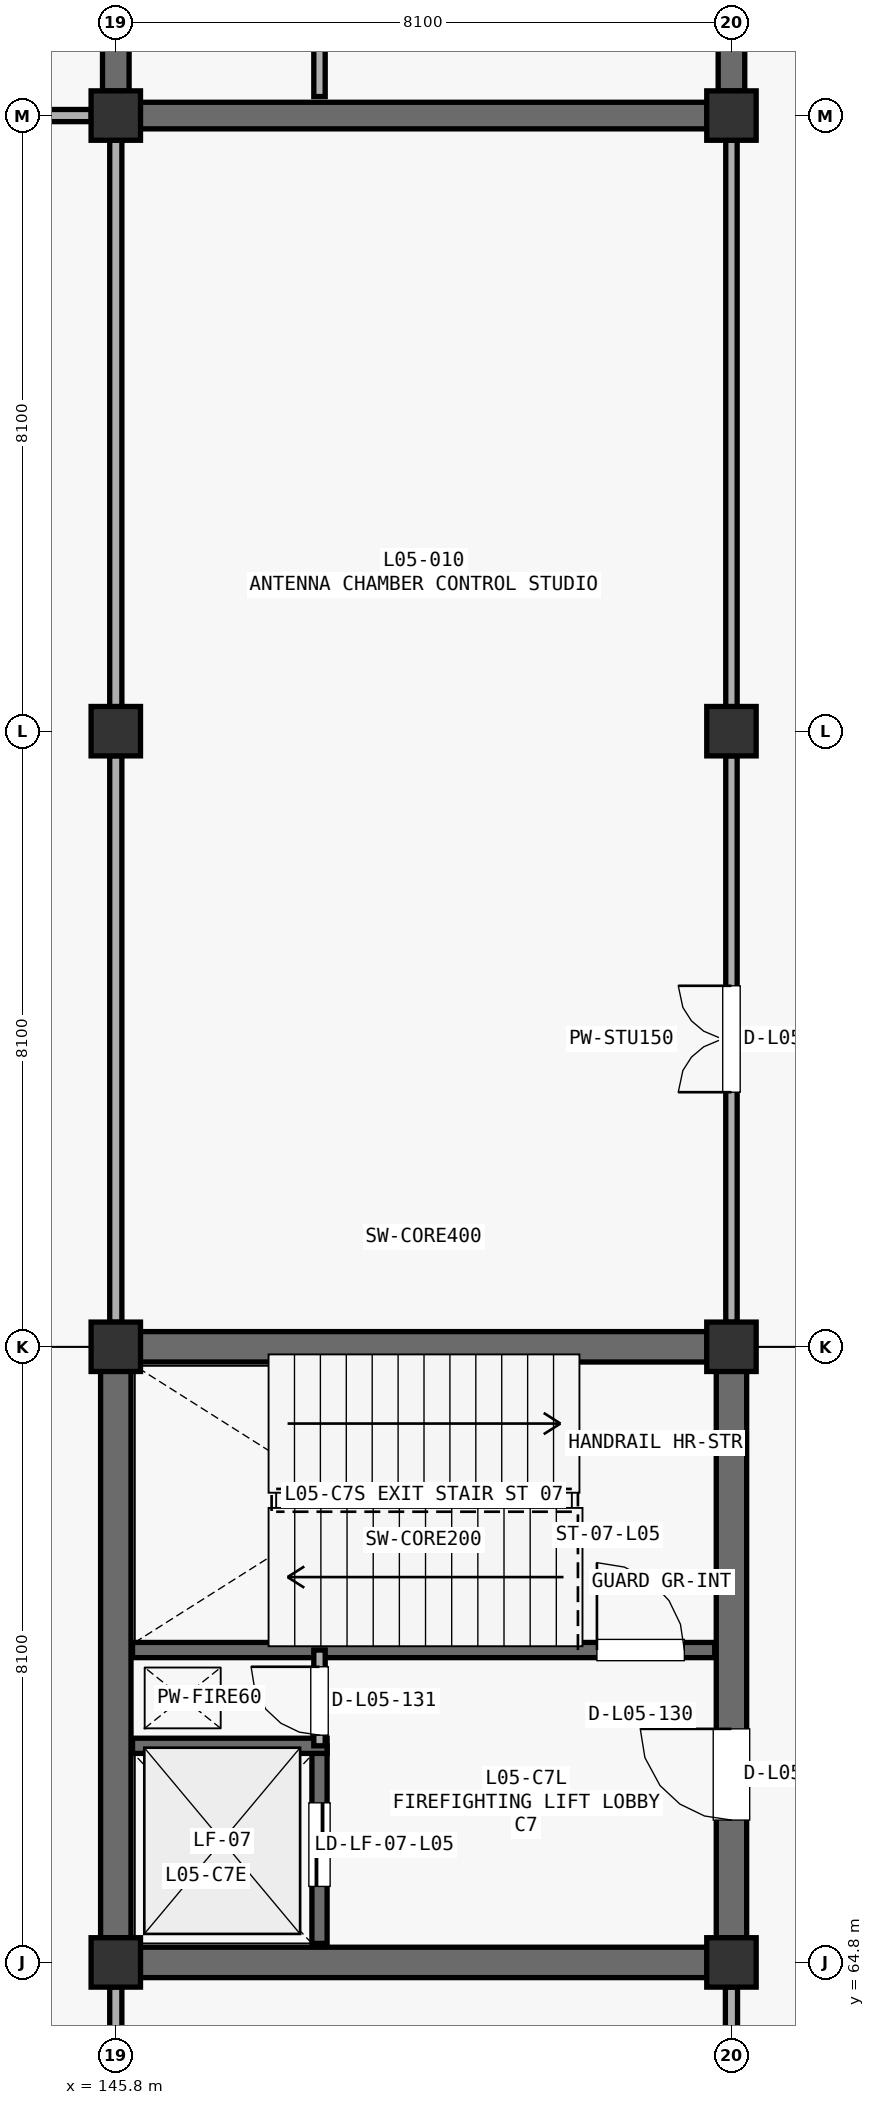
"""IFC4 building model, lengths in metres.
Left out: names, types, materials, properties, quantities, classifications, styles, units other than length and angle.
Written with IfcOpenShell. Run it as: python <this file> out.ifc"""

import sys

from ifc_helpers import new_model, si_unit, direction, frame, frame_2d, origin, origin_2d, place, context, subcontext, project, spatial, rectangle, extrude, element, fill, save


model = new_model("IFC4")
c1 = context("Model", 3, precision=1e-05, world=origin(), true_north=direction((0.0, 1.0)))
c2 = subcontext(c1, "Body", "Model", "MODEL_VIEW")
j1 = project(units=[si_unit("LENGTHUNIT", "METRE"), si_unit("PLANEANGLEUNIT", "RADIAN")], contexts=[c1])
p1 = place(None, origin())
s1 = spatial("IfcSite", under=j1, at=p1, CompositionType="ELEMENT")
p2 = place(p1, origin())
s2 = spatial("IfcBuilding", under=s1, at=p2, CompositionType="ELEMENT")
p3 = place(p2, frame((0.0, 0.0, 22.95)))
s3 = spatial("IfcBuildingStorey", under=s2, at=p3, CompositionType="ELEMENT", Elevation=22.95)
for number, where, z_axis, x_axis in (
    (1, (145.8, 64.8, 0.0), (0.0, 0.0, 1.0), (1.0, 0.0, 0.0)),
    (2, (145.8, 72.9, 0.0), (0.0, 0.0, 1.0), (1.0, 0.0, 0.0)),
    (3, (145.8, 81.0, 0.0), (0.0, 0.0, 1.0), (1.0, 0.0, 0.0)),
    (4, (145.8, 89.1, 0.0), (0.0, 0.0, 1.0), (1.0, 0.0, 0.0)),
    (5, (153.9, 64.8, 0.0), (0.0, 0.0, 1.0), (1.0, 0.0, 0.0)),
    (6, (153.9, 72.9, 0.0), (0.0, 0.0, 1.0), (1.0, 0.0, 0.0)),
    (7, (153.9, 81.0, 0.0), (0.0, 0.0, 1.0), (1.0, 0.0, 0.0)),
    (8, (153.9, 89.1, 0.0), (0.0, 0.0, 1.0), (1.0, 0.0, 0.0)),
):
    element("IfcColumn", number, at=place(p3, frame(where, z_axis=z_axis, x_axis=x_axis)), inside=s3, PredefinedType="COLUMN", context=c2, shape_type="SweptSolid", body=[
        extrude(rectangle(XDim=0.65, YDim=0.65, at=origin_2d()), origin(), (0.0, 0.0, 1.0), 4.42),
    ])
for number, where, z_axis, x_axis in (
    (9, (146.123, 72.9, 0.0), (0.0, 0.0, 1.0), (1.0, 0.0, 0.0)),
    (10, (145.8, 65.123, 0.0), (0.0, 0.0, 1.0), (0.0, 1.0, 0.0)),
):
    element("IfcWall", number, at=place(p3, frame(where, z_axis=z_axis, x_axis=x_axis)), inside=s3, PredefinedType="SHEAR", context=c2, shape_type="SweptSolid", body=[
        extrude(rectangle(XDim=7.454, YDim=0.4, at=frame_2d((3.727, 0.0))), origin(), (0.0, 0.0, 1.0), 4.162),
    ])
p4 = place(p3, frame((153.9, 65.123, 0.0), z_axis=(0.0, 0.0, 1.0), x_axis=(0.0, 1.0, 0.0)))
e11 = element("IfcWall", 11, at=p4, inside=s3, PredefinedType="SHEAR", context=c2, shape_type="SweptSolid", body=[
    extrude(rectangle(XDim=7.454, YDim=0.4, at=frame_2d((3.727, 0.0))), origin(), (0.0, 0.0, 1.0), 4.162),
])
p5 = place(p4, frame((1.55, 0.0, 0.0)))
e12 = element("IfcOpeningElement", 12, at=p5, cuts=e11, PredefinedType="OPENING", context=c2, shape_type="SweptSolid", body=[
    extrude(rectangle(XDim=1.2, YDim=2.2, at=frame_2d((0.6, 1.1))), frame((0.0, 0.21, 0.0), z_axis=(0.0, -1.0, 0.0), x_axis=(1.0, 0.0, 0.0)), (0.0, 0.0, 1.0), 0.42),
])
p6 = place(p3, frame((146.123, 64.8, 0.0), z_axis=(0.0, 0.0, 1.0), x_axis=(1.0, 0.0, 0.0)))
e13 = element("IfcWall", 13, at=p6, inside=s3, PredefinedType="SHEAR", context=c2, shape_type="SweptSolid", body=[
    extrude(rectangle(XDim=7.454, YDim=0.4, at=frame_2d((3.727, 0.0))), origin(), (0.0, 0.0, 1.0), 4.162),
])
p7 = place(p3, frame((146.02, 68.91, 0.0), z_axis=(0.0, 0.0, 1.0), x_axis=(1.0, 0.0, 0.0)))
e14 = element("IfcWall", 14, at=p7, inside=s3, PredefinedType="SHEAR", context=c2, shape_type="SweptSolid", body=[
    extrude(rectangle(XDim=7.66, YDim=0.2, at=frame_2d((3.83, 0.0))), origin(), (0.0, 0.0, 1.0), 4.162),
])
p8 = place(p7, frame((6.11, 0.0, 0.0)))
e15 = element("IfcOpeningElement", 15, at=p8, cuts=e14, PredefinedType="OPENING", context=c2, shape_type="SweptSolid", body=[
    extrude(rectangle(XDim=1.15, YDim=2.2, at=frame_2d((0.575, 1.1))), frame((0.0, 0.11, 0.0), z_axis=(0.0, -1.0, 0.0), x_axis=(1.0, 0.0, 0.0)), (0.0, 0.0, 1.0), 0.22),
])
p9 = place(p3, frame((148.48, 65.05, 0.0), z_axis=(0.0, 0.0, 1.0), x_axis=(0.0, 1.0, 0.0)))
e16 = element("IfcWall", 16, at=p9, inside=s3, PredefinedType="SHEAR", context=c2, shape_type="SweptSolid", body=[
    extrude(rectangle(XDim=2.6, YDim=0.2, at=frame_2d((1.3, 0.0))), origin(), (0.0, 0.0, 1.0), 4.162),
])
p10 = place(p9, frame((0.75, 0.0, 0.0)))
e17 = element("IfcOpeningElement", 17, at=p10, cuts=e16, PredefinedType="OPENING", context=c2, shape_type="SweptSolid", body=[
    extrude(rectangle(XDim=1.1, YDim=2.2, at=frame_2d((0.55, 1.1))), frame((0.0, 0.11, 0.0), z_axis=(0.0, -1.0, 0.0), x_axis=(1.0, 0.0, 0.0)), (0.0, 0.0, 1.0), 0.22),
])
p11 = place(p3, frame((146.02, 67.65, 0.0), z_axis=(0.0, 0.0, 1.0), x_axis=(1.0, 0.0, 0.0)))
e18 = element("IfcWall", 18, at=p11, inside=s3, PredefinedType="SHEAR", context=c2, shape_type="SweptSolid", body=[
    extrude(rectangle(XDim=2.56, YDim=0.2, at=frame_2d((1.28, 0.0))), origin(), (0.0, 0.0, 1.0), 4.162),
])
p12 = place(p3, frame((148.48, 67.65, 0.0), z_axis=(0.0, 0.0, 1.0), x_axis=(0.0, 1.0, 0.0)))
e19 = element("IfcWall", 19, at=p12, inside=s3, PredefinedType="PARTITIONING", context=c2, shape_type="SweptSolid", body=[
    extrude(rectangle(XDim=1.26, YDim=0.15, at=frame_2d((0.63, 0.0))), origin(), (0.0, 0.0, 1.0), 4.162),
])
p13 = place(p12, frame((0.14, 0.0, 0.0)))
e20 = element("IfcOpeningElement", 20, at=p13, cuts=e19, PredefinedType="OPENING", context=c2, shape_type="SweptSolid", body=[
    extrude(rectangle(XDim=0.9, YDim=2.15, at=frame_2d((0.45, 1.075))), frame((0.0, 0.085, 0.0), z_axis=(0.0, -1.0, 0.0), x_axis=(1.0, 0.0, 0.0)), (0.0, 0.0, 1.0), 0.17),
])
p14 = place(p3, frame((145.8, 89.423, 0.0), z_axis=(0.0, 0.0, 1.0), x_axis=(0.0, 1.0, 0.0)))
e21 = element("IfcWall", 21, at=p14, inside=s3, PredefinedType="SHEAR", context=c2, shape_type="SweptSolid", body=[
    extrude(rectangle(XDim=7.454, YDim=0.35, at=frame_2d((3.727, 0.0))), origin(), (0.0, 0.0, 1.0), 4.162),
])
p15 = place(p3, frame((153.9, 89.423, 0.0), z_axis=(0.0, 0.0, 1.0), x_axis=(0.0, 1.0, 0.0)))
e22 = element("IfcWall", 22, at=p15, inside=s3, PredefinedType="SHEAR", context=c2, shape_type="SweptSolid", body=[
    extrude(rectangle(XDim=7.454, YDim=0.35, at=frame_2d((3.727, 0.0))), origin(), (0.0, 0.0, 1.0), 4.162),
])
p16 = place(p15, frame((1.55, 0.0, 0.0)))
e23 = element("IfcOpeningElement", 23, at=p16, cuts=e22, PredefinedType="OPENING", context=c2, shape_type="SweptSolid", body=[
    extrude(rectangle(XDim=1.2, YDim=2.2, at=frame_2d((0.6, 1.1))), frame((0.0, 0.185, 0.0), z_axis=(0.0, -1.0, 0.0), x_axis=(1.0, 0.0, 0.0)), (0.0, 0.0, 1.0), 0.37),
])
p17 = place(p3, frame((146.123, 89.1, 0.0), z_axis=(0.0, 0.0, 1.0), x_axis=(1.0, 0.0, 0.0)))
e24 = element("IfcWall", 24, at=p17, inside=s3, PredefinedType="SHEAR", context=c2, shape_type="SweptSolid", body=[
    extrude(rectangle(XDim=7.454, YDim=0.35, at=frame_2d((3.727, 0.0))), origin(), (0.0, 0.0, 1.0), 4.162),
])
p18 = place(p3, frame((148.48, 89.35, 0.0), z_axis=(0.0, 0.0, 1.0), x_axis=(0.0, 1.0, 0.0)))
e25 = element("IfcWall", 25, at=p18, inside=s3, PredefinedType="PARTITIONING", context=c2, shape_type="SweptSolid", body=[
    extrude(rectangle(XDim=2.6, YDim=0.15, at=frame_2d((1.3, 0.0))), origin(), (0.0, 0.0, 1.0), 4.162),
])
p19 = place(p18, frame((0.8, 0.0, 0.0)))
e26 = element("IfcOpeningElement", 26, at=p19, cuts=e25, PredefinedType="OPENING", context=c2, shape_type="SweptSolid", body=[
    extrude(rectangle(XDim=0.95, YDim=2.15, at=frame_2d((0.475, 1.075))), frame((0.0, 0.085, 0.0), z_axis=(0.0, -1.0, 0.0), x_axis=(1.0, 0.0, 0.0)), (0.0, 0.0, 1.0), 0.17),
])
p20 = place(p3, frame((145.8, 57.023, 0.0), z_axis=(0.0, 0.0, 1.0), x_axis=(0.0, 1.0, 0.0)))
e27 = element("IfcWall", 27, at=p20, inside=s3, PredefinedType="PARTITIONING", context=c2, shape_type="SweptSolid", body=[
    extrude(rectangle(XDim=7.454, YDim=0.16, at=frame_2d((3.727, 0.0))), origin(), (0.0, 0.0, 1.0), 3.212),
])
p21 = place(p20, frame((2.867, 0.0, 0.0)))
e28 = element("IfcOpeningElement", 28, at=p21, cuts=e27, PredefinedType="OPENING", context=c2, shape_type="SweptSolid", body=[
    extrude(rectangle(XDim=1.72, YDim=2.3, at=frame_2d((0.86, 1.15))), frame((0.0, 0.09, 0.0), z_axis=(0.0, -1.0, 0.0), x_axis=(1.0, 0.0, 0.0)), (0.0, 0.0, 1.0), 0.18),
])
p22 = place(p3, frame((145.8, 73.223, 0.0), z_axis=(0.0, 0.0, 1.0), x_axis=(0.0, 1.0, 0.0)))
e29 = element("IfcWall", 29, at=p22, inside=s3, PredefinedType="PARTITIONING", context=c2, shape_type="SweptSolid", body=[
    extrude(rectangle(XDim=7.454, YDim=0.16, at=frame_2d((3.727, 0.0))), origin(), (0.0, 0.0, 1.0), 3.512),
])
p23 = place(p3, frame((145.8, 81.323, 0.0), z_axis=(0.0, 0.0, 1.0), x_axis=(0.0, 1.0, 0.0)))
e30 = element("IfcWall", 30, at=p23, inside=s3, PredefinedType="PARTITIONING", context=c2, shape_type="SweptSolid", body=[
    extrude(rectangle(XDim=7.454, YDim=0.16, at=frame_2d((3.727, 0.0))), origin(), (0.0, 0.0, 1.0), 3.562),
])
p24 = place(p3, frame((138.023, 89.1, 0.0), z_axis=(0.0, 0.0, 1.0), x_axis=(1.0, 0.0, 0.0)))
e31 = element("IfcWall", 31, at=p24, inside=s3, PredefinedType="PARTITIONING", context=c2, shape_type="SweptSolid", body=[
    extrude(rectangle(XDim=7.454, YDim=0.16, at=frame_2d((3.727, 0.0))), origin(), (0.0, 0.0, 1.0), 3.212),
])
p25 = place(p3, frame((153.9, 73.223, 0.0), z_axis=(0.0, 0.0, 1.0), x_axis=(0.0, 1.0, 0.0)))
e32 = element("IfcWall", 32, at=p25, inside=s3, PredefinedType="PARTITIONING", context=c2, shape_type="SweptSolid", body=[
    extrude(rectangle(XDim=7.454, YDim=0.15, at=frame_2d((3.727, 0.0))), origin(), (0.0, 0.0, 1.0), 3.312),
])
p26 = place(p25, frame((3.027, 0.0, 0.0)))
e33 = element("IfcOpeningElement", 33, at=p26, cuts=e32, PredefinedType="OPENING", context=c2, shape_type="SweptSolid", body=[
    extrude(rectangle(XDim=1.4, YDim=2.2, at=frame_2d((0.7, 1.1))), frame((0.0, 0.085, 0.0), z_axis=(0.0, -1.0, 0.0), x_axis=(1.0, 0.0, 0.0)), (0.0, 0.0, 1.0), 0.17),
])
p27 = place(p3, frame((153.9, 81.323, 0.0), z_axis=(0.0, 0.0, 1.0), x_axis=(0.0, 1.0, 0.0)))
e34 = element("IfcWall", 34, at=p27, inside=s3, PredefinedType="PARTITIONING", context=c2, shape_type="SweptSolid", body=[
    extrude(rectangle(XDim=7.454, YDim=0.15, at=frame_2d((3.727, 0.0))), origin(), (0.0, 0.0, 1.0), 3.212),
])
p28 = place(p3, frame((153.9, 57.023, 0.0), z_axis=(0.0, 0.0, 1.0), x_axis=(0.0, 1.0, 0.0)))
e35 = element("IfcWall", 35, at=p28, inside=s3, PredefinedType="PARTITIONING", context=c2, shape_type="SweptSolid", body=[
    extrude(rectangle(XDim=7.454, YDim=0.16, at=frame_2d((3.727, 0.0))), origin(), (0.0, 0.0, 1.0), 3.512),
])
p29 = place(p28, frame((3.127, 0.0, 0.0)))
e36 = element("IfcOpeningElement", 36, at=p29, cuts=e35, PredefinedType="OPENING", context=c2, shape_type="SweptSolid", body=[
    extrude(rectangle(XDim=1.2, YDim=2.2, at=frame_2d((0.6, 1.1))), frame((0.0, 0.09, 0.0), z_axis=(0.0, -1.0, 0.0), x_axis=(1.0, 0.0, 0.0)), (0.0, 0.0, 1.0), 0.18),
])
p30 = place(p5, origin())
e37 = element("IfcDoor", 37, at=p30, inside=s3, OperationType="SINGLE_SWING_RIGHT", PredefinedType="DOOR", context=c2, shape_type="SweptSolid", body=[
    extrude(rectangle(XDim=1.2, YDim=2.2, at=frame_2d((0.6, 1.1))), frame((0.0, 0.025, 0.0), z_axis=(0.0, -1.0, 0.0), x_axis=(1.0, 0.0, 0.0)), (0.0, 0.0, 1.0), 0.05),
])
fill(e12, e37)
p31 = place(p8, origin())
e38 = element("IfcDoor", 38, at=p31, inside=s3, OperationType="SINGLE_SWING_LEFT", PredefinedType="DOOR", context=c2, shape_type="SweptSolid", body=[
    extrude(rectangle(XDim=1.15, YDim=2.2, at=frame_2d((0.575, 1.1))), frame((0.0, 0.025, 0.0), z_axis=(0.0, -1.0, 0.0), x_axis=(1.0, 0.0, 0.0)), (0.0, 0.0, 1.0), 0.05),
])
fill(e15, e38)
p32 = place(p10, origin())
e39 = element("IfcDoor", 39, at=p32, inside=s3, OperationType="SLIDING_TO_LEFT", PredefinedType="DOOR", context=c2, shape_type="SweptSolid", body=[
    extrude(rectangle(XDim=1.1, YDim=2.2, at=frame_2d((0.55, 1.1))), frame((0.0, 0.025, 0.0), z_axis=(0.0, -1.0, 0.0), x_axis=(1.0, 0.0, 0.0)), (0.0, 0.0, 1.0), 0.05),
])
fill(e17, e39)
p33 = place(p13, origin())
e40 = element("IfcDoor", 40, at=p33, inside=s3, OperationType="SINGLE_SWING_RIGHT", PredefinedType="DOOR", context=c2, shape_type="SweptSolid", body=[
    extrude(rectangle(XDim=0.9, YDim=2.15, at=frame_2d((0.45, 1.075))), frame((0.0, 0.025, 0.0), z_axis=(0.0, -1.0, 0.0), x_axis=(1.0, 0.0, 0.0)), (0.0, 0.0, 1.0), 0.05),
])
fill(e20, e40)
p34 = place(p26, origin())
e41 = element("IfcDoor", 41, at=p34, inside=s3, OperationType="DOUBLE_SWING_LEFT", PredefinedType="DOOR", context=c2, shape_type="SweptSolid", body=[
    extrude(rectangle(XDim=1.4, YDim=2.2, at=frame_2d((0.7, 1.1))), frame((0.0, 0.025, 0.0), z_axis=(0.0, -1.0, 0.0), x_axis=(1.0, 0.0, 0.0)), (0.0, 0.0, 1.0), 0.05),
])
fill(e33, e41)
save(model, sys.argv[1])
